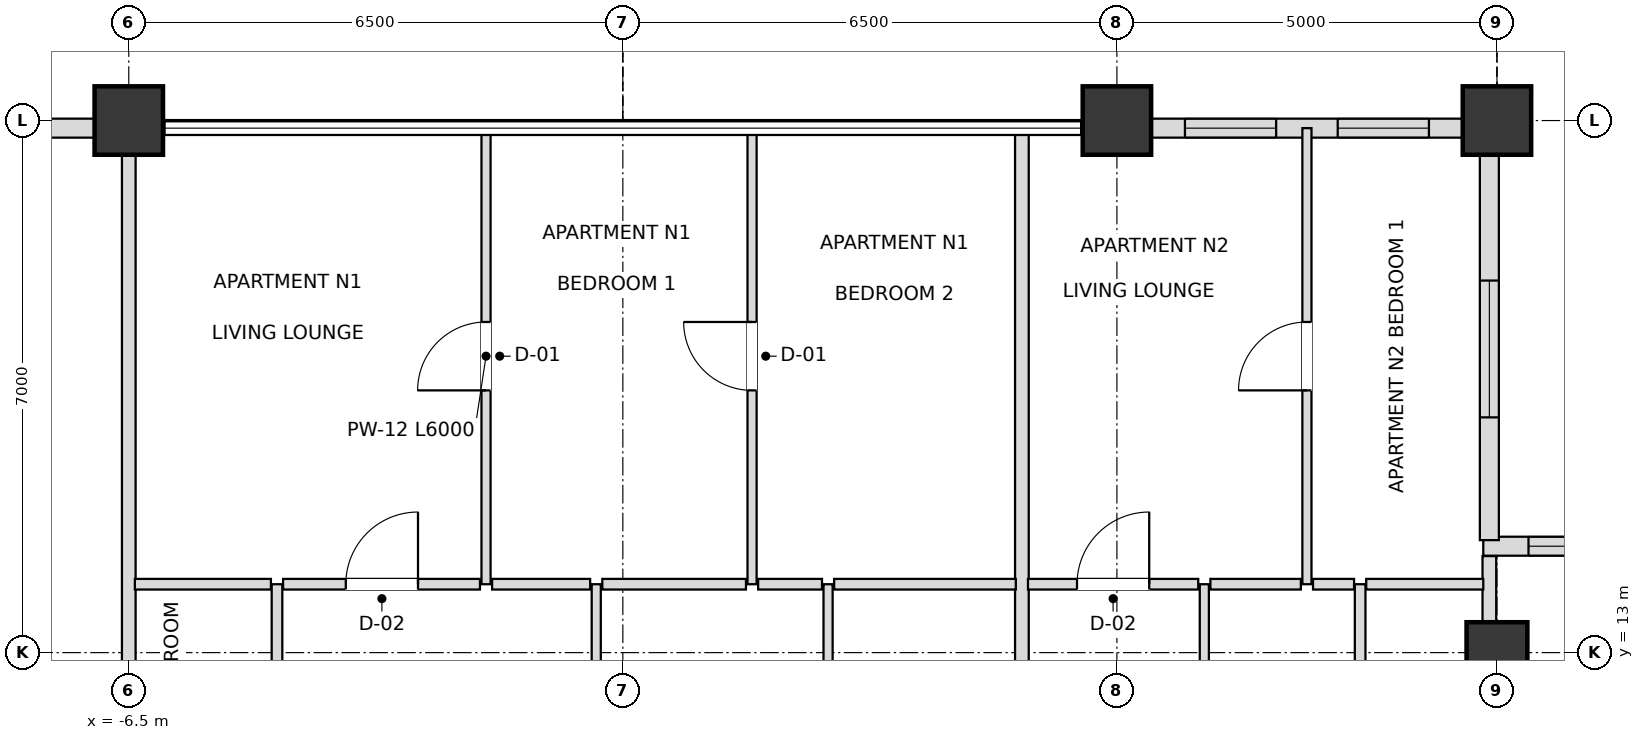
"""IFC4 building model, lengths in metres.
Left out: names, types, materials, properties, quantities, classifications, styles, units other than length and angle.
Written with IfcOpenShell. Run it as: python <this file> out.ifc"""

import sys

from ifc_helpers import new_model, si_unit, direction, frame, frame_2d, origin, origin_2d, place, context, subcontext, project, spatial, rectangle, extrude, element, fill, save


model = new_model("IFC4")
c1 = context("Model", 3, precision=1e-05, world=origin(), true_north=direction((0.0, 1.0)))
c2 = subcontext(c1, "Body", "Model", "MODEL_VIEW")
j1 = project(units=[si_unit("LENGTHUNIT", "METRE"), si_unit("PLANEANGLEUNIT", "RADIAN")], contexts=[c1])
p1 = place(None, origin())
s1 = spatial("IfcSite", under=j1, at=p1, CompositionType="ELEMENT")
p2 = place(p1, origin())
s2 = spatial("IfcBuilding", under=s1, at=p2, CompositionType="ELEMENT")
p3 = place(p2, frame((0.0, 0.0, 283.5)))
s3 = spatial("IfcBuildingStorey", under=s2, at=p3, CompositionType="ELEMENT", Elevation=283.5)
for number, where, z_axis, x_axis in (
    (1, (11.5, 20.0, 0.0), (0.0, 0.0, 1.0), (1.0, 0.0, 0.0)),
    (2, (6.5, 20.0, 0.0), (0.0, 0.0, 1.0), (1.0, 0.0, 0.0)),
    (3, (-6.5, 20.0, 0.0), (0.0, 0.0, 1.0), (1.0, 0.0, 0.0)),
):
    element("IfcColumn", number, at=place(p3, frame(where, z_axis=z_axis, x_axis=x_axis)), inside=s3, PredefinedType="USERDEFINED", context=c2, shape_type="SweptSolid", body=[
        extrude(rectangle(XDim=0.9, YDim=0.9, at=origin_2d()), origin(), (0.0, 0.0, 1.0), 3.6),
    ])
p4 = place(p3, frame((11.5, 13.0, 0.0), z_axis=(0.0, 0.0, 1.0), x_axis=(1.0, 0.0, 0.0)))
e4 = element("IfcColumn", 4, at=p4, inside=s3, PredefinedType="COLUMN", context=c2, shape_type="SweptSolid", body=[
    extrude(rectangle(XDim=0.8, YDim=0.8, at=origin_2d()), origin(), (0.0, 0.0, 1.0), 3.6),
])
p5 = place(p3, frame((11.055, 19.9, 0.0), z_axis=(0.0, 0.0, 1.0), x_axis=(-1.0, 0.0, 0.0)))
e5 = element("IfcWall", 5, at=p5, inside=s3, PredefinedType="SOLIDWALL", context=c2, shape_type="SweptSolid", body=[
    extrude(rectangle(XDim=4.11, YDim=0.25, at=frame_2d((2.055, 0.0))), origin(), (0.0, 0.0, 1.0), 2.748),
])
p6 = place(p5, frame((0.45, 0.0, 0.72)))
e6 = element("IfcOpeningElement", 6, at=p6, cuts=e5, PredefinedType="OPENING", context=c2, shape_type="SweptSolid", body=[
    extrude(rectangle(XDim=1.2, YDim=1.68, at=frame_2d((0.6, 0.84))), frame((0.0, 0.135, 0.0), z_axis=(0.0, -1.0, 0.0), x_axis=(1.0, 0.0, 0.0)), (0.0, 0.0, 1.0), 0.27),
])
p7 = place(p5, frame((2.46, 0.0, 0.72)))
e7 = element("IfcOpeningElement", 7, at=p7, cuts=e5, PredefinedType="OPENING", context=c2, shape_type="SweptSolid", body=[
    extrude(rectangle(XDim=1.2, YDim=1.68, at=frame_2d((0.6, 0.84))), frame((0.0, 0.135, 0.0), z_axis=(0.0, -1.0, 0.0), x_axis=(1.0, 0.0, 0.0)), (0.0, 0.0, 1.0), 0.27),
])
p8 = place(p3, frame((-6.945, 19.9, 0.0), z_axis=(0.0, 0.0, 1.0), x_axis=(-1.0, 0.0, 0.0)))
e8 = element("IfcWall", 8, at=p8, inside=s3, PredefinedType="SOLIDWALL", context=c2, shape_type="SweptSolid", body=[
    extrude(rectangle(XDim=4.11, YDim=0.25, at=frame_2d((2.055, 0.0))), origin(), (0.0, 0.0, 1.0), 2.748),
])
p9 = place(p8, frame((1.155, 0.0, 0.72)))
e9 = element("IfcOpeningElement", 9, at=p9, cuts=e8, PredefinedType="OPENING", context=c2, shape_type="SweptSolid", body=[
    extrude(rectangle(XDim=1.8, YDim=1.68, at=frame_2d((0.9, 0.84))), frame((0.0, 0.135, 0.0), z_axis=(0.0, -1.0, 0.0), x_axis=(1.0, 0.0, 0.0)), (0.0, 0.0, 1.0), 0.27),
])
p10 = place(p3, frame((16.98, 14.4, 0.0), z_axis=(0.0, 0.0, 1.0), x_axis=(-1.0, 0.0, 0.0)))
e10 = element("IfcWall", 10, at=p10, inside=s3, PredefinedType="SOLIDWALL", context=c2, shape_type="SweptSolid", body=[
    extrude(rectangle(XDim=5.66, YDim=0.25, at=frame_2d((2.83, 0.0))), origin(), (0.0, 0.0, 1.0), 2.748),
])
p11 = place(p10, frame((0.595, 0.0, 0.72)))
e11 = element("IfcOpeningElement", 11, at=p11, cuts=e10, PredefinedType="OPENING", context=c2, shape_type="SweptSolid", body=[
    extrude(rectangle(XDim=1.8, YDim=1.68, at=frame_2d((0.9, 0.84))), frame((0.0, 0.135, 0.0), z_axis=(0.0, -1.0, 0.0), x_axis=(1.0, 0.0, 0.0)), (0.0, 0.0, 1.0), 0.27),
])
p12 = place(p10, frame((3.265, 0.0, 0.72)))
e12 = element("IfcOpeningElement", 12, at=p12, cuts=e10, PredefinedType="OPENING", context=c2, shape_type="SweptSolid", body=[
    extrude(rectangle(XDim=1.8, YDim=1.68, at=frame_2d((0.9, 0.84))), frame((0.0, 0.135, 0.0), z_axis=(0.0, -1.0, 0.0), x_axis=(1.0, 0.0, 0.0)), (0.0, 0.0, 1.0), 0.27),
])
p13 = place(p3, frame((11.4, 14.48, 0.0), z_axis=(0.0, 0.0, 1.0), x_axis=(0.0, 1.0, 0.0)))
e13 = element("IfcWall", 13, at=p13, inside=s3, PredefinedType="SOLIDWALL", context=c2, shape_type="SweptSolid", body=[
    extrude(rectangle(XDim=5.34, YDim=0.25, at=frame_2d((2.67, 0.0))), origin(), (0.0, 0.0, 1.0), 2.748),
])
p14 = place(p13, frame((1.615, 0.0, 0.72)))
e14 = element("IfcOpeningElement", 14, at=p14, cuts=e13, PredefinedType="OPENING", context=c2, shape_type="SweptSolid", body=[
    extrude(rectangle(XDim=1.8, YDim=1.68, at=frame_2d((0.9, 0.84))), frame((0.0, 0.135, 0.0), z_axis=(0.0, -1.0, 0.0), x_axis=(1.0, 0.0, 0.0)), (0.0, 0.0, 1.0), 0.27),
])
p15 = place(p3, frame((-6.5, 9.2, 0.0), z_axis=(0.0, 0.0, 1.0), x_axis=(0.0, 1.0, 0.0)))
e15 = element("IfcWall", 15, at=p15, inside=s3, PredefinedType="PARTITIONING", context=c2, shape_type="SweptSolid", body=[
    extrude(rectangle(XDim=10.7, YDim=0.18, at=frame_2d((5.35, 0.0))), origin(), (0.0, 0.0, 1.0), 2.826),
])
p16 = place(p3, frame((-4.55, 9.2, 0.0), z_axis=(0.0, 0.0, 1.0), x_axis=(0.0, 1.0, 0.0)))
e16 = element("IfcWall", 16, at=p16, inside=s3, PredefinedType="PARTITIONING", context=c2, shape_type="SweptSolid", body=[
    extrude(rectangle(XDim=4.7, YDim=0.14, at=frame_2d((2.35, 0.0))), origin(), (0.0, 0.0, 1.0), 3.38),
])
p17 = place(p16, frame((1.9, 0.0, 0.0)))
e17 = element("IfcOpeningElement", 17, at=p17, cuts=e16, PredefinedType="OPENING", context=c2, shape_type="SweptSolid", body=[
    extrude(rectangle(XDim=0.9, YDim=2.1, at=frame_2d((0.45, 1.05))), frame((0.0, 0.08, 0.0), z_axis=(0.0, -1.0, 0.0), x_axis=(1.0, 0.0, 0.0)), (0.0, 0.0, 1.0), 0.16),
])
p18 = place(p3, frame((-1.8, 13.9, 0.0), z_axis=(0.0, 0.0, 1.0), x_axis=(0.0, 1.0, 0.0)))
e18 = element("IfcWall", 18, at=p18, inside=s3, PredefinedType="PARTITIONING", context=c2, shape_type="SweptSolid", body=[
    extrude(rectangle(XDim=6.0, YDim=0.12, at=frame_2d((3.0, 0.0))), origin(), (0.0, 0.0, 1.0), 3.018),
])
p19 = place(p18, frame((2.55, 0.0, 0.0)))
e19 = element("IfcOpeningElement", 19, at=p19, cuts=e18, PredefinedType="OPENING", context=c2, shape_type="SweptSolid", body=[
    extrude(rectangle(XDim=0.9, YDim=2.1, at=frame_2d((0.45, 1.05))), frame((0.0, 0.07, 0.0), z_axis=(0.0, -1.0, 0.0), x_axis=(1.0, 0.0, 0.0)), (0.0, 0.0, 1.0), 0.14),
])
p20 = place(p3, frame((-0.35, 9.2, 0.0), z_axis=(0.0, 0.0, 1.0), x_axis=(0.0, 1.0, 0.0)))
e20 = element("IfcWall", 20, at=p20, inside=s3, PredefinedType="PARTITIONING", context=c2, shape_type="SweptSolid", body=[
    extrude(rectangle(XDim=4.7, YDim=0.12, at=frame_2d((2.35, 0.0))), origin(), (0.0, 0.0, 1.0), 3.38),
])
p21 = place(p20, frame((1.875, 0.0, 0.0)))
e21 = element("IfcOpeningElement", 21, at=p21, cuts=e20, PredefinedType="OPENING", context=c2, shape_type="SweptSolid", body=[
    extrude(rectangle(XDim=0.95, YDim=2.1, at=frame_2d((0.475, 1.05))), frame((0.0, 0.07, 0.0), z_axis=(0.0, -1.0, 0.0), x_axis=(1.0, 0.0, 0.0)), (0.0, 0.0, 1.0), 0.14),
])
p22 = place(p3, frame((1.7, 13.9, 0.0), z_axis=(0.0, 0.0, 1.0), x_axis=(0.0, 1.0, 0.0)))
e22 = element("IfcWall", 22, at=p22, inside=s3, PredefinedType="PARTITIONING", context=c2, shape_type="SweptSolid", body=[
    extrude(rectangle(XDim=6.0, YDim=0.12, at=frame_2d((3.0, 0.0))), origin(), (0.0, 0.0, 1.0), 3.018),
])
p23 = place(p22, frame((2.55, 0.0, 0.0)))
e23 = element("IfcOpeningElement", 23, at=p23, cuts=e22, PredefinedType="OPENING", context=c2, shape_type="SweptSolid", body=[
    extrude(rectangle(XDim=0.9, YDim=2.1, at=frame_2d((0.45, 1.05))), frame((0.0, 0.07, 0.0), z_axis=(0.0, -1.0, 0.0), x_axis=(1.0, 0.0, 0.0)), (0.0, 0.0, 1.0), 0.14),
])
p24 = place(p3, frame((2.7, 9.2, 0.0), z_axis=(0.0, 0.0, 1.0), x_axis=(0.0, 1.0, 0.0)))
e24 = element("IfcWall", 24, at=p24, inside=s3, PredefinedType="PARTITIONING", context=c2, shape_type="SweptSolid", body=[
    extrude(rectangle(XDim=4.7, YDim=0.12, at=frame_2d((2.35, 0.0))), origin(), (0.0, 0.0, 1.0), 3.38),
])
p25 = place(p24, frame((1.9, 0.0, 0.0)))
e25 = element("IfcOpeningElement", 25, at=p25, cuts=e24, PredefinedType="OPENING", context=c2, shape_type="SweptSolid", body=[
    extrude(rectangle(XDim=0.9, YDim=2.1, at=frame_2d((0.45, 1.05))), frame((0.0, 0.07, 0.0), z_axis=(0.0, -1.0, 0.0), x_axis=(1.0, 0.0, 0.0)), (0.0, 0.0, 1.0), 0.14),
])
p26 = place(p3, frame((5.25, 9.2, 0.0), z_axis=(0.0, 0.0, 1.0), x_axis=(0.0, 1.0, 0.0)))
e26 = element("IfcWall", 26, at=p26, inside=s3, PredefinedType="PARTITIONING", context=c2, shape_type="SweptSolid", body=[
    extrude(rectangle(XDim=10.7, YDim=0.18, at=frame_2d((5.35, 0.0))), origin(), (0.0, 0.0, 1.0), 3.018),
])
p27 = place(p3, frame((7.65, 9.2, 0.0), z_axis=(0.0, 0.0, 1.0), x_axis=(0.0, 1.0, 0.0)))
e27 = element("IfcWall", 27, at=p27, inside=s3, PredefinedType="PARTITIONING", context=c2, shape_type="SweptSolid", body=[
    extrude(rectangle(XDim=4.7, YDim=0.12, at=frame_2d((2.35, 0.0))), origin(), (0.0, 0.0, 1.0), 2.826),
])
p28 = place(p27, frame((1.875, 0.0, 0.0)))
e28 = element("IfcOpeningElement", 28, at=p28, cuts=e27, PredefinedType="OPENING", context=c2, shape_type="SweptSolid", body=[
    extrude(rectangle(XDim=0.95, YDim=2.1, at=frame_2d((0.475, 1.05))), frame((0.0, 0.07, 0.0), z_axis=(0.0, -1.0, 0.0), x_axis=(1.0, 0.0, 0.0)), (0.0, 0.0, 1.0), 0.14),
])
p29 = place(p3, frame((9.0, 13.9, 0.0), z_axis=(0.0, 0.0, 1.0), x_axis=(0.0, 1.0, 0.0)))
e29 = element("IfcWall", 29, at=p29, inside=s3, PredefinedType="PARTITIONING", context=c2, shape_type="SweptSolid", body=[
    extrude(rectangle(XDim=6.0, YDim=0.12, at=frame_2d((3.0, 0.0))), origin(), (0.0, 0.0, 1.0), 3.38),
])
p30 = place(p29, frame((2.55, 0.0, 0.0)))
e30 = element("IfcOpeningElement", 30, at=p30, cuts=e29, PredefinedType="OPENING", context=c2, shape_type="SweptSolid", body=[
    extrude(rectangle(XDim=0.9, YDim=2.1, at=frame_2d((0.45, 1.05))), frame((0.0, 0.07, 0.0), z_axis=(0.0, -1.0, 0.0), x_axis=(1.0, 0.0, 0.0)), (0.0, 0.0, 1.0), 0.14),
])
p31 = place(p3, frame((9.7, 9.2, 0.0), z_axis=(0.0, 0.0, 1.0), x_axis=(0.0, 1.0, 0.0)))
e31 = element("IfcWall", 31, at=p31, inside=s3, PredefinedType="PARTITIONING", context=c2, shape_type="SweptSolid", body=[
    extrude(rectangle(XDim=4.7, YDim=0.14, at=frame_2d((2.35, 0.0))), origin(), (0.0, 0.0, 1.0), 2.826),
])
p32 = place(p31, frame((1.9, 0.0, 0.0)))
e32 = element("IfcOpeningElement", 32, at=p32, cuts=e31, PredefinedType="OPENING", context=c2, shape_type="SweptSolid", body=[
    extrude(rectangle(XDim=0.9, YDim=2.1, at=frame_2d((0.45, 1.05))), frame((0.0, 0.08, 0.0), z_axis=(0.0, -1.0, 0.0), x_axis=(1.0, 0.0, 0.0)), (0.0, 0.0, 1.0), 0.16),
])
p33 = place(p3, frame((11.4, 9.2, 0.0), z_axis=(0.0, 0.0, 1.0), x_axis=(0.0, 1.0, 0.0)))
e33 = element("IfcWall", 33, at=p33, inside=s3, PredefinedType="PARTITIONING", context=c2, shape_type="SweptSolid", body=[
    extrude(rectangle(XDim=5.07, YDim=0.18, at=frame_2d((2.535, 0.0))), origin(), (0.0, 0.0, 1.0), 2.748),
])
p34 = place(p3, frame((-6.42, 13.9, 0.0), z_axis=(0.0, 0.0, 1.0), x_axis=(1.0, 0.0, 0.0)))
e34 = element("IfcWall", 34, at=p34, inside=s3, PredefinedType="PARTITIONING", context=c2, shape_type="SweptSolid", body=[
    extrude(rectangle(XDim=1.79, YDim=0.14, at=frame_2d((0.895, 0.0))), origin(), (0.0, 0.0, 1.0), 3.38),
])
p35 = place(p3, frame((-4.47, 13.9, 0.0), z_axis=(0.0, 0.0, 1.0), x_axis=(1.0, 0.0, 0.0)))
e35 = element("IfcWall", 35, at=p35, inside=s3, PredefinedType="PARTITIONING", context=c2, shape_type="SweptSolid", body=[
    extrude(rectangle(XDim=2.59, YDim=0.14, at=frame_2d((1.295, 0.0))), origin(), (0.0, 0.0, 1.0), 3.38),
])
p36 = place(p35, frame((0.825, 0.0, 0.0)))
e36 = element("IfcOpeningElement", 36, at=p36, cuts=e35, PredefinedType="OPENING", context=c2, shape_type="SweptSolid", body=[
    extrude(rectangle(XDim=0.95, YDim=2.1, at=frame_2d((0.475, 1.05))), frame((0.0, 0.08, 0.0), z_axis=(0.0, -1.0, 0.0), x_axis=(1.0, 0.0, 0.0)), (0.0, 0.0, 1.0), 0.16),
])
p37 = place(p3, frame((-1.72, 13.9, 0.0), z_axis=(0.0, 0.0, 1.0), x_axis=(1.0, 0.0, 0.0)))
e37 = element("IfcWall", 37, at=p37, inside=s3, PredefinedType="PARTITIONING", context=c2, shape_type="SweptSolid", body=[
    extrude(rectangle(XDim=1.29, YDim=0.14, at=frame_2d((0.645, 0.0))), origin(), (0.0, 0.0, 1.0), 3.38),
])
p38 = place(p3, frame((-0.27, 13.9, 0.0), z_axis=(0.0, 0.0, 1.0), x_axis=(1.0, 0.0, 0.0)))
e38 = element("IfcWall", 38, at=p38, inside=s3, PredefinedType="PARTITIONING", context=c2, shape_type="SweptSolid", body=[
    extrude(rectangle(XDim=1.89, YDim=0.14, at=frame_2d((0.945, 0.0))), origin(), (0.0, 0.0, 1.0), 3.38),
])
p39 = place(p3, frame((1.78, 13.9, 0.0), z_axis=(0.0, 0.0, 1.0), x_axis=(1.0, 0.0, 0.0)))
e39 = element("IfcWall", 39, at=p39, inside=s3, PredefinedType="PARTITIONING", context=c2, shape_type="SweptSolid", body=[
    extrude(rectangle(XDim=0.84, YDim=0.14, at=frame_2d((0.42, 0.0))), origin(), (0.0, 0.0, 1.0), 3.38),
])
p40 = place(p3, frame((2.78, 13.9, 0.0), z_axis=(0.0, 0.0, 1.0), x_axis=(1.0, 0.0, 0.0)))
e40 = element("IfcWall", 40, at=p40, inside=s3, PredefinedType="PARTITIONING", context=c2, shape_type="SweptSolid", body=[
    extrude(rectangle(XDim=2.39, YDim=0.14, at=frame_2d((1.195, 0.0))), origin(), (0.0, 0.0, 1.0), 3.38),
])
p41 = place(p3, frame((5.33, 13.9, 0.0), z_axis=(0.0, 0.0, 1.0), x_axis=(1.0, 0.0, 0.0)))
e41 = element("IfcWall", 41, at=p41, inside=s3, PredefinedType="PARTITIONING", context=c2, shape_type="SweptSolid", body=[
    extrude(rectangle(XDim=2.24, YDim=0.14, at=frame_2d((1.12, 0.0))), origin(), (0.0, 0.0, 1.0), 2.826),
])
p42 = place(p41, frame((0.645, 0.0, 0.0)))
e42 = element("IfcOpeningElement", 42, at=p42, cuts=e41, PredefinedType="OPENING", context=c2, shape_type="SweptSolid", body=[
    extrude(rectangle(XDim=0.95, YDim=2.1, at=frame_2d((0.475, 1.05))), frame((0.0, 0.08, 0.0), z_axis=(0.0, -1.0, 0.0), x_axis=(1.0, 0.0, 0.0)), (0.0, 0.0, 1.0), 0.16),
])
p43 = place(p3, frame((7.73, 13.9, 0.0), z_axis=(0.0, 0.0, 1.0), x_axis=(1.0, 0.0, 0.0)))
e43 = element("IfcWall", 43, at=p43, inside=s3, PredefinedType="PARTITIONING", context=c2, shape_type="SweptSolid", body=[
    extrude(rectangle(XDim=1.19, YDim=0.14, at=frame_2d((0.595, 0.0))), origin(), (0.0, 0.0, 1.0), 3.38),
])
p44 = place(p3, frame((9.08, 13.9, 0.0), z_axis=(0.0, 0.0, 1.0), x_axis=(1.0, 0.0, 0.0)))
e44 = element("IfcWall", 44, at=p44, inside=s3, PredefinedType="PARTITIONING", context=c2, shape_type="SweptSolid", body=[
    extrude(rectangle(XDim=0.54, YDim=0.14, at=frame_2d((0.27, 0.0))), origin(), (0.0, 0.0, 1.0), 3.38),
])
p45 = place(p3, frame((9.78, 13.9, 0.0), z_axis=(0.0, 0.0, 1.0), x_axis=(1.0, 0.0, 0.0)))
e45 = element("IfcWall", 45, at=p45, inside=s3, PredefinedType="PARTITIONING", context=c2, shape_type="SweptSolid", body=[
    extrude(rectangle(XDim=1.54, YDim=0.14, at=frame_2d((0.77, 0.0))), origin(), (0.0, 0.0, 1.0), 3.38),
])
p46 = place(p6, origin())
e46 = element("IfcWindow", 46, at=p46, inside=s3, PartitioningType="SINGLE_PANEL", PredefinedType="WINDOW", context=c2, shape_type="SweptSolid", body=[
    extrude(rectangle(XDim=1.2, YDim=1.68, at=frame_2d((0.6, 0.84))), frame((0.0, 0.03, 0.0), z_axis=(0.0, -1.0, 0.0), x_axis=(1.0, 0.0, 0.0)), (0.0, 0.0, 1.0), 0.06),
])
fill(e6, e46)
p47 = place(p7, origin())
e47 = element("IfcWindow", 47, at=p47, inside=s3, PartitioningType="SINGLE_PANEL", PredefinedType="WINDOW", context=c2, shape_type="SweptSolid", body=[
    extrude(rectangle(XDim=1.2, YDim=1.68, at=frame_2d((0.6, 0.84))), frame((0.0, 0.03, 0.0), z_axis=(0.0, -1.0, 0.0), x_axis=(1.0, 0.0, 0.0)), (0.0, 0.0, 1.0), 0.06),
])
fill(e7, e47)
p48 = place(p12, origin())
e48 = element("IfcWindow", 48, at=p48, inside=s3, PartitioningType="SINGLE_PANEL", PredefinedType="WINDOW", context=c2, shape_type="SweptSolid", body=[
    extrude(rectangle(XDim=1.8, YDim=1.68, at=frame_2d((0.9, 0.84))), frame((0.0, 0.03, 0.0), z_axis=(0.0, -1.0, 0.0), x_axis=(1.0, 0.0, 0.0)), (0.0, 0.0, 1.0), 0.06),
])
fill(e12, e48)
p49 = place(p14, origin())
e49 = element("IfcWindow", 49, at=p49, inside=s3, PartitioningType="SINGLE_PANEL", PredefinedType="WINDOW", context=c2, shape_type="SweptSolid", body=[
    extrude(rectangle(XDim=1.8, YDim=1.68, at=frame_2d((0.9, 0.84))), frame((0.0, 0.03, 0.0), z_axis=(0.0, -1.0, 0.0), x_axis=(1.0, 0.0, 0.0)), (0.0, 0.0, 1.0), 0.06),
])
fill(e14, e49)
p50 = place(p36, origin())
e50 = element("IfcDoor", 50, at=p50, inside=s3, OperationType="SINGLE_SWING_RIGHT", PredefinedType="DOOR", context=c2, shape_type="SweptSolid", body=[
    extrude(rectangle(XDim=0.95, YDim=2.1, at=frame_2d((0.475, 1.05))), frame((0.0, 0.025, 0.0), z_axis=(0.0, -1.0, 0.0), x_axis=(1.0, 0.0, 0.0)), (0.0, 0.0, 1.0), 0.05),
])
fill(e36, e50)
p51 = place(p19, origin())
e51 = element("IfcDoor", 51, at=p51, inside=s3, OperationType="SINGLE_SWING_LEFT", PredefinedType="DOOR", context=c2, shape_type="SweptSolid", body=[
    extrude(rectangle(XDim=0.9, YDim=2.1, at=frame_2d((0.45, 1.05))), frame((0.0, 0.025, 0.0), z_axis=(0.0, -1.0, 0.0), x_axis=(1.0, 0.0, 0.0)), (0.0, 0.0, 1.0), 0.05),
])
fill(e19, e51)
p52 = place(p23, origin())
e52 = element("IfcDoor", 52, at=p52, inside=s3, OperationType="SINGLE_SWING_RIGHT", PredefinedType="DOOR", context=c2, shape_type="SweptSolid", body=[
    extrude(rectangle(XDim=0.9, YDim=2.1, at=frame_2d((0.45, 1.05))), frame((0.0, 0.025, 0.0), z_axis=(0.0, -1.0, 0.0), x_axis=(1.0, 0.0, 0.0)), (0.0, 0.0, 1.0), 0.05),
])
fill(e23, e52)
p53 = place(p42, origin())
e53 = element("IfcDoor", 53, at=p53, inside=s3, OperationType="SINGLE_SWING_RIGHT", PredefinedType="DOOR", context=c2, shape_type="SweptSolid", body=[
    extrude(rectangle(XDim=0.95, YDim=2.1, at=frame_2d((0.475, 1.05))), frame((0.0, 0.025, 0.0), z_axis=(0.0, -1.0, 0.0), x_axis=(1.0, 0.0, 0.0)), (0.0, 0.0, 1.0), 0.05),
])
fill(e42, e53)
p54 = place(p30, origin())
e54 = element("IfcDoor", 54, at=p54, inside=s3, OperationType="SINGLE_SWING_LEFT", PredefinedType="DOOR", context=c2, shape_type="SweptSolid", body=[
    extrude(rectangle(XDim=0.9, YDim=2.1, at=frame_2d((0.45, 1.05))), frame((0.0, 0.025, 0.0), z_axis=(0.0, -1.0, 0.0), x_axis=(1.0, 0.0, 0.0)), (0.0, 0.0, 1.0), 0.05),
])
fill(e30, e54)
save(model, sys.argv[1])
